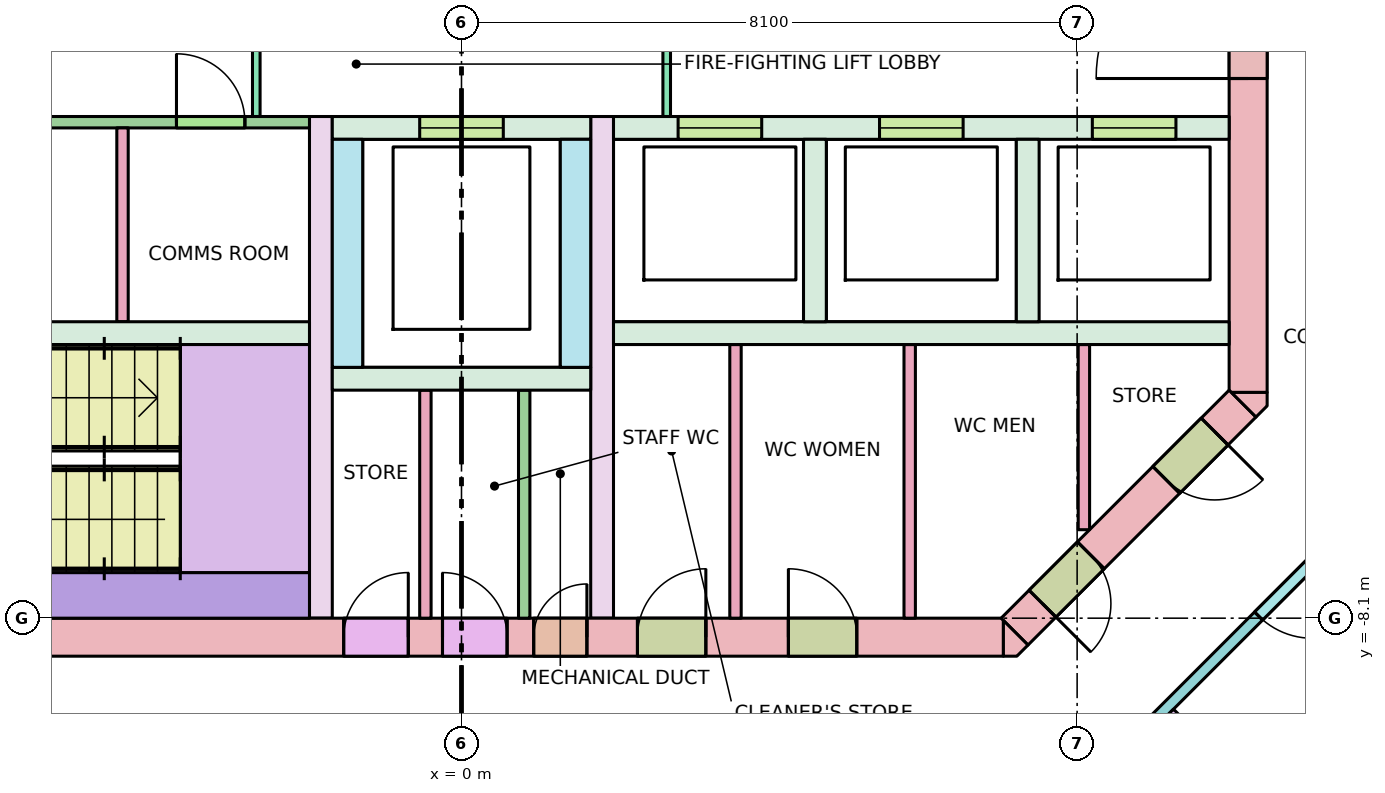
"""IFC4 building model, lengths in metres.
Left out: names, types, materials, properties, quantities, classifications, styles, units other than length and angle.
Written with IfcOpenShell. Run it as: python <this file> out.ifc"""

import sys

from ifc_helpers import new_model, si_unit, direction, frame, frame_2d, origin, place, context, subcontext, project, spatial, polyline, rectangle, outline, extrude, element, fill, save


model = new_model("IFC4")
c1 = context("Model", 3, precision=1e-05, world=origin(), true_north=direction((0.0, 1.0)))
c2 = subcontext(c1, "Body", "Model", "MODEL_VIEW")
j1 = project(units=[si_unit("LENGTHUNIT", "METRE"), si_unit("PLANEANGLEUNIT", "RADIAN")], contexts=[c1])
p1 = place(None, origin())
s1 = spatial("IfcSite", under=j1, at=p1, CompositionType="ELEMENT")
p2 = place(p1, origin())
s2 = spatial("IfcBuilding", under=s1, at=p2, CompositionType="ELEMENT")
p3 = place(p2, frame((0.0, 0.0, 272.3)))
s3 = spatial("IfcBuildingStorey", under=s2, at=p3, CompositionType="ELEMENT", Elevation=272.3)
p4 = place(p3, frame((-7.13, -8.35, -0.28), z_axis=(0.0, 0.0, 1.0), x_axis=(1.0, 0.0, 0.0)))
e1 = element("IfcWall", 1, at=p4, inside=s3, PredefinedType="SHEAR", context=c2, shape_type="SweptSolid", body=[
    extrude(rectangle(XDim=14.26, YDim=0.5, at=frame_2d((7.13, 0.0))), origin(), (0.0, 0.0, 1.0), 3.7),
])
p5 = place(p4, frame((8.08, 0.0, 0.28)))
e2 = element("IfcOpeningElement", 2, at=p5, cuts=e1, PredefinedType="OPENING", context=c2, shape_type="SweptSolid", body=[
    extrude(rectangle(XDim=0.7, YDim=2.1, at=frame_2d((0.35, 1.05))), frame((0.0, 0.26, 0.0), z_axis=(0.0, -1.0, 0.0), x_axis=(1.0, 0.0, 0.0)), (0.0, 0.0, 1.0), 0.52),
])
p6 = place(p4, frame((5.58, 0.0, 0.28)))
e3 = element("IfcOpeningElement", 3, at=p6, cuts=e1, PredefinedType="OPENING", context=c2, shape_type="SweptSolid", body=[
    extrude(rectangle(XDim=0.85, YDim=2.1, at=frame_2d((0.425, 1.05))), frame((0.0, 0.26, 0.0), z_axis=(0.0, -1.0, 0.0), x_axis=(1.0, 0.0, 0.0)), (0.0, 0.0, 1.0), 0.52),
])
p7 = place(p4, frame((6.88, 0.0, 0.28)))
e4 = element("IfcOpeningElement", 4, at=p7, cuts=e1, PredefinedType="OPENING", context=c2, shape_type="SweptSolid", body=[
    extrude(rectangle(XDim=0.85, YDim=2.1, at=frame_2d((0.425, 1.05))), frame((0.0, 0.26, 0.0), z_axis=(0.0, -1.0, 0.0), x_axis=(1.0, 0.0, 0.0)), (0.0, 0.0, 1.0), 0.52),
])
p8 = place(p4, frame((9.445, 0.0, 0.28)))
e5 = element("IfcOpeningElement", 5, at=p8, cuts=e1, PredefinedType="OPENING", context=c2, shape_type="SweptSolid", body=[
    extrude(rectangle(XDim=0.9, YDim=2.1, at=frame_2d((0.45, 1.05))), frame((0.0, 0.26, 0.0), z_axis=(0.0, -1.0, 0.0), x_axis=(1.0, 0.0, 0.0)), (0.0, 0.0, 1.0), 0.52),
])
p9 = place(p4, frame((11.431, 0.0, 0.28)))
e6 = element("IfcOpeningElement", 6, at=p9, cuts=e1, PredefinedType="OPENING", context=c2, shape_type="SweptSolid", body=[
    extrude(rectangle(XDim=0.9, YDim=2.1, at=frame_2d((0.45, 1.05))), frame((0.0, 0.26, 0.0), z_axis=(0.0, -1.0, 0.0), x_axis=(1.0, 0.0, 0.0)), (0.0, 0.0, 1.0), 0.52),
])
p10 = place(p3, frame((10.35, -5.13, -0.28), z_axis=(0.0, 0.0, 1.0), x_axis=(0.0, 1.0, 0.0)))
e7 = element("IfcWall", 7, at=p10, inside=s3, PredefinedType="SHEAR", context=c2, shape_type="SweptSolid", body=[
    extrude(rectangle(XDim=10.26, YDim=0.5, at=frame_2d((5.13, 0.0))), origin(), (0.0, 0.0, 1.0), 3.7),
])
p11 = place(p10, frame((4.13, 0.0, 0.28)))
e8 = element("IfcOpeningElement", 8, at=p11, cuts=e7, PredefinedType="OPENING", context=c2, shape_type="SweptSolid", body=[
    extrude(rectangle(XDim=2.0, YDim=2.1, at=frame_2d((1.0, 1.05))), frame((0.0, 0.26, 0.0), z_axis=(0.0, -1.0, 0.0), x_axis=(1.0, 0.0, 0.0)), (0.0, 0.0, 1.0), 0.52),
])
p12 = place(p3, frame((10.277, -5.277, -0.28), z_axis=(0.0, 0.0, 1.0), x_axis=(-0.707106781187, -0.707106781187, 0.0)))
e9 = element("IfcWall", 9, at=p12, inside=s3, PredefinedType="SHEAR", context=c2, shape_type="SweptSolid", body=[
    extrude(rectangle(XDim=4.243, YDim=0.5, at=frame_2d((2.121, 0.0))), origin(), (0.0, 0.0, 1.0), 3.7),
])
p13 = place(p12, frame((2.823, 0.0, 0.28)))
e10 = element("IfcOpeningElement", 10, at=p13, cuts=e9, PredefinedType="OPENING", context=c2, shape_type="SweptSolid", body=[
    extrude(rectangle(XDim=0.9, YDim=2.1, at=frame_2d((0.45, 1.05))), frame((0.0, 0.26, 0.0), z_axis=(0.0, -1.0, 0.0), x_axis=(1.0, 0.0, 0.0)), (0.0, 0.0, 1.0), 0.52),
])
p14 = place(p12, frame((0.52, 0.0, 0.28)))
e11 = element("IfcOpeningElement", 11, at=p14, cuts=e9, PredefinedType="OPENING", context=c2, shape_type="SweptSolid", body=[
    extrude(rectangle(XDim=0.9, YDim=2.1, at=frame_2d((0.45, 1.05))), frame((0.0, 0.26, 0.0), z_axis=(0.0, -1.0, 0.0), x_axis=(1.0, 0.0, 0.0)), (0.0, 0.0, 1.0), 0.52),
])
p15 = place(p3, frame((0.0, 0.0, -0.28)))
e12 = element("IfcWall", 12, at=p15, inside=s3, PredefinedType="SHEAR", context=c2, shape_type="SweptSolid", body=[
    extrude(outline(polyline([(7.307, -8.6), (7.13, -8.6), (7.13, -8.13), (7.454, -8.454), (7.307, -8.6)])), origin(), (0.0, 0.0, 1.0), 3.7),
])
p16 = place(p3, frame((0.0, 0.0, -0.28)))
e13 = element("IfcWall", 13, at=p16, inside=s3, PredefinedType="SHEAR", context=c2, shape_type="SweptSolid", body=[
    extrude(outline(polyline([(10.6, -5.307), (10.454, -5.454), (10.13, -5.13), (10.6, -5.13), (10.6, -5.307)])), origin(), (0.0, 0.0, 1.0), 3.7),
])
for number, where, z_axis, x_axis in (
    (14, (-10.1, -4.35, 0.0), (0.0, 0.0, 1.0), (1.0, 0.0, 0.0)),
    (15, (2.0, -4.35, 0.0), (0.0, 0.0, 1.0), (1.0, 0.0, 0.0)),
):
    element("IfcWall", number, at=place(p3, frame(where, z_axis=z_axis, x_axis=x_axis)), inside=s3, PredefinedType="SOLIDWALL", context=c2, shape_type="SweptSolid", body=[
        extrude(rectangle(XDim=8.1, YDim=0.3, at=frame_2d((4.05, 0.0))), origin(), (0.0, 0.0, 1.0), 3.42),
    ])
p17 = place(p3, frame((2.0, -1.65, 0.0), z_axis=(0.0, 0.0, 1.0), x_axis=(1.0, 0.0, 0.0)))
e16 = element("IfcWall", 16, at=p17, inside=s3, PredefinedType="SOLIDWALL", context=c2, shape_type="SweptSolid", body=[
    extrude(rectangle(XDim=8.1, YDim=0.3, at=frame_2d((4.05, 0.0))), origin(), (0.0, 0.0, 1.0), 3.42),
])
p18 = place(p17, frame((0.85, 0.0, 0.0)))
e17 = element("IfcOpeningElement", 17, at=p18, cuts=e16, PredefinedType="OPENING", context=c2, shape_type="SweptSolid", body=[
    extrude(rectangle(XDim=1.1, YDim=2.1, at=frame_2d((0.55, 1.05))), frame((0.0, 0.16, 0.0), z_axis=(0.0, -1.0, 0.0), x_axis=(1.0, 0.0, 0.0)), (0.0, 0.0, 1.0), 0.32),
])
p19 = place(p17, frame((3.5, 0.0, 0.0)))
e18 = element("IfcOpeningElement", 18, at=p19, cuts=e16, PredefinedType="OPENING", context=c2, shape_type="SweptSolid", body=[
    extrude(rectangle(XDim=1.1, YDim=2.1, at=frame_2d((0.55, 1.05))), frame((0.0, 0.16, 0.0), z_axis=(0.0, -1.0, 0.0), x_axis=(1.0, 0.0, 0.0)), (0.0, 0.0, 1.0), 0.32),
])
p20 = place(p17, frame((6.3, 0.0, 0.0)))
e19 = element("IfcOpeningElement", 19, at=p20, cuts=e16, PredefinedType="OPENING", context=c2, shape_type="SweptSolid", body=[
    extrude(rectangle(XDim=1.1, YDim=2.1, at=frame_2d((0.55, 1.05))), frame((0.0, 0.16, 0.0), z_axis=(0.0, -1.0, 0.0), x_axis=(1.0, 0.0, 0.0)), (0.0, 0.0, 1.0), 0.32),
])
for number, where, z_axis, x_axis in (
    (20, (4.65, -4.2, 0.0), (0.0, 0.0, 1.0), (0.0, 1.0, 0.0)),
    (21, (7.45, -4.2, 0.0), (0.0, 0.0, 1.0), (0.0, 1.0, 0.0)),
):
    element("IfcWall", number, at=place(p3, frame(where, z_axis=z_axis, x_axis=x_axis)), inside=s3, PredefinedType="SOLIDWALL", context=c2, shape_type="SweptSolid", body=[
        extrude(rectangle(XDim=2.4, YDim=0.3, at=frame_2d((1.2, 0.0))), origin(), (0.0, 0.0, 1.0), 3.42),
    ])
for number, where, z_axis, x_axis in (
    (22, (-1.85, -8.1, 0.0), (0.0, 0.0, 1.0), (0.0, 1.0, 0.0)),
    (23, (1.85, -8.1, 0.0), (0.0, 0.0, 1.0), (0.0, 1.0, 0.0)),
):
    element("IfcWall", number, at=place(p3, frame(where, z_axis=z_axis, x_axis=x_axis)), inside=s3, PredefinedType="SHEAR", context=c2, shape_type="SweptSolid", body=[
        extrude(rectangle(XDim=6.6, YDim=0.3, at=frame_2d((3.3, 0.0))), origin(), (0.0, 0.0, 1.0), 3.42),
    ])
p21 = place(p3, frame((-1.7, -1.65, 0.0), z_axis=(0.0, 0.0, 1.0), x_axis=(1.0, 0.0, 0.0)))
e24 = element("IfcWall", 24, at=p21, inside=s3, PredefinedType="SOLIDWALL", context=c2, shape_type="SweptSolid", body=[
    extrude(rectangle(XDim=3.4, YDim=0.3, at=frame_2d((1.7, 0.0))), origin(), (0.0, 0.0, 1.0), 3.42),
])
p22 = place(p21, frame((1.15, 0.0, 0.0)))
e25 = element("IfcOpeningElement", 25, at=p22, cuts=e24, PredefinedType="OPENING", context=c2, shape_type="SweptSolid", body=[
    extrude(rectangle(XDim=1.1, YDim=2.1, at=frame_2d((0.55, 1.05))), frame((0.0, 0.16, 0.0), z_axis=(0.0, -1.0, 0.0), x_axis=(1.0, 0.0, 0.0)), (0.0, 0.0, 1.0), 0.32),
])
for number, where, z_axis, x_axis in (
    (26, (-1.5, -4.8, 0.0), (0.0, 0.0, 1.0), (0.0, 1.0, 0.0)),
    (27, (1.5, -4.8, 0.0), (0.0, 0.0, 1.0), (0.0, 1.0, 0.0)),
):
    element("IfcWall", number, at=place(p3, frame(where, z_axis=z_axis, x_axis=x_axis)), inside=s3, PredefinedType="SOLIDWALL", context=c2, shape_type="SweptSolid", body=[
        extrude(rectangle(XDim=3.0, YDim=0.4, at=frame_2d((1.5, 0.0))), origin(), (0.0, 0.0, 1.0), 3.42),
    ])
p23 = place(p3, frame((-1.7, -4.95, 0.0), z_axis=(0.0, 0.0, 1.0), x_axis=(1.0, 0.0, 0.0)))
e28 = element("IfcWall", 28, at=p23, inside=s3, PredefinedType="SOLIDWALL", context=c2, shape_type="SweptSolid", body=[
    extrude(rectangle(XDim=3.4, YDim=0.3, at=frame_2d((1.7, 0.0))), origin(), (0.0, 0.0, 1.0), 3.42),
])
p24 = place(p3, frame((-7.37, -7.8, 0.0), z_axis=(0.0, 0.0, 1.0), x_axis=(1.0, 0.0, 0.0)))
e29 = element("IfcWall", 29, at=p24, inside=s3, PredefinedType="SHEAR", context=c2, shape_type="SweptSolid", body=[
    extrude(rectangle(XDim=5.37, YDim=0.6, at=frame_2d((2.685, 0.0))), origin(), (0.0, 0.0, 1.0), 3.42),
])
p25 = place(p3, frame((-2.7, -1.5, 0.0), z_axis=(0.0, 0.0, 1.0), x_axis=(0.0, 1.0, 0.0)))
e30 = element("IfcWall", 30, at=p25, inside=s3, PredefinedType="PARTITIONING", context=c2, shape_type="SweptSolid", body=[
    extrude(rectangle(XDim=3.0, YDim=0.1, at=frame_2d((1.5, 0.0))), origin(), (0.0, 0.0, 1.0), 3.42),
])
p26 = place(p25, frame((0.9, 0.0, 0.0)))
e31 = element("IfcOpeningElement", 31, at=p26, cuts=e30, PredefinedType="OPENING", context=c2, shape_type="SweptSolid", body=[
    extrude(rectangle(XDim=1.2, YDim=2.1, at=frame_2d((0.6, 1.05))), frame((0.0, 0.06, 0.0), z_axis=(0.0, -1.0, 0.0), x_axis=(1.0, 0.0, 0.0)), (0.0, 0.0, 1.0), 0.12),
])
p27 = place(p3, frame((2.7, -1.5, 0.0), z_axis=(0.0, 0.0, 1.0), x_axis=(0.0, 1.0, 0.0)))
e32 = element("IfcWall", 32, at=p27, inside=s3, PredefinedType="PARTITIONING", context=c2, shape_type="SweptSolid", body=[
    extrude(rectangle(XDim=3.0, YDim=0.1, at=frame_2d((1.5, 0.0))), origin(), (0.0, 0.0, 1.0), 3.42),
])
p28 = place(p27, frame((0.9, 0.0, 0.0)))
e33 = element("IfcOpeningElement", 33, at=p28, cuts=e32, PredefinedType="OPENING", context=c2, shape_type="SweptSolid", body=[
    extrude(rectangle(XDim=1.2, YDim=2.1, at=frame_2d((0.6, 1.05))), frame((0.0, 0.06, 0.0), z_axis=(0.0, -1.0, 0.0), x_axis=(1.0, 0.0, 0.0)), (0.0, 0.0, 1.0), 0.12),
])
for number, where, z_axis, x_axis in (
    (34, (0.825, -8.1, 0.0), (0.0, 0.0, 1.0), (0.0, 1.0, 0.0)),
    (35, (-0.475, -8.1, 0.0), (0.0, 0.0, 1.0), (0.0, 1.0, 0.0)),
):
    element("IfcWall", number, at=place(p3, frame(where, z_axis=z_axis, x_axis=x_axis)), inside=s3, PredefinedType="PARTITIONING", context=c2, shape_type="SweptSolid", body=[
        extrude(rectangle(XDim=3.0, YDim=0.15, at=frame_2d((1.5, 0.0))), origin(), (0.0, 0.0, 1.0), 3.42),
    ])
for number, where, z_axis, x_axis in (
    (36, (3.605, -8.1, 0.0), (0.0, 0.0, 1.0), (0.0, 1.0, 0.0)),
    (37, (5.897, -8.1, 0.0), (0.0, 0.0, 1.0), (0.0, 1.0, 0.0)),
):
    element("IfcWall", number, at=place(p3, frame(where, z_axis=z_axis, x_axis=x_axis)), inside=s3, PredefinedType="PARTITIONING", context=c2, shape_type="SweptSolid", body=[
        extrude(rectangle(XDim=3.6, YDim=0.15, at=frame_2d((1.8, 0.0))), origin(), (0.0, 0.0, 1.0), 3.42),
    ])
p29 = place(p3, frame((8.189, -6.936, 0.0), z_axis=(0.0, 0.0, 1.0), x_axis=(0.0, 1.0, 0.0)))
e38 = element("IfcWall", 38, at=p29, inside=s3, PredefinedType="PARTITIONING", context=c2, shape_type="SweptSolid", body=[
    extrude(rectangle(XDim=2.436, YDim=0.15, at=frame_2d((1.218, 0.0))), origin(), (0.0, 0.0, 1.0), 3.42),
])
p30 = place(p3, frame((-4.46, -4.2, 0.0), z_axis=(0.0, 0.0, 1.0), x_axis=(0.0, 1.0, 0.0)))
e39 = element("IfcWall", 39, at=p30, inside=s3, PredefinedType="PARTITIONING", context=c2, shape_type="SweptSolid", body=[
    extrude(rectangle(XDim=2.55, YDim=0.15, at=frame_2d((1.275, 0.0))), origin(), (0.0, 0.0, 1.0), 3.42),
])
p31 = place(p3, frame((-10.1, -1.575, 0.0), z_axis=(0.0, 0.0, 1.0), x_axis=(1.0, 0.0, 0.0)))
e40 = element("IfcWall", 40, at=p31, inside=s3, PredefinedType="PARTITIONING", context=c2, shape_type="SweptSolid", body=[
    extrude(rectangle(XDim=8.1, YDim=0.15, at=frame_2d((4.05, 0.0))), origin(), (0.0, 0.0, 1.0), 3.42),
])
p32 = place(p31, frame((2.333, 0.0, 0.0)))
e41 = element("IfcOpeningElement", 41, at=p32, cuts=e40, PredefinedType="OPENING", context=c2, shape_type="SweptSolid", body=[
    extrude(rectangle(XDim=0.9, YDim=2.1, at=frame_2d((0.45, 1.05))), frame((0.0, 0.085, 0.0), z_axis=(0.0, -1.0, 0.0), x_axis=(1.0, 0.0, 0.0)), (0.0, 0.0, 1.0), 0.17),
])
p33 = place(p31, frame((6.35, 0.0, 0.0)))
e42 = element("IfcOpeningElement", 42, at=p33, cuts=e40, PredefinedType="OPENING", context=c2, shape_type="SweptSolid", body=[
    extrude(rectangle(XDim=0.9, YDim=2.1, at=frame_2d((0.45, 1.05))), frame((0.0, 0.085, 0.0), z_axis=(0.0, -1.0, 0.0), x_axis=(1.0, 0.0, 0.0)), (0.0, 0.0, 1.0), 0.17),
])
p34 = place(p3, frame((12.438, -6.121, 0.0), z_axis=(0.0, 0.0, 1.0), x_axis=(-0.707106781187, -0.707106781187, 0.0)))
e43 = element("IfcWall", 43, at=p34, inside=s3, PredefinedType="PARTITIONING", context=c2, shape_type="SweptSolid", body=[
    extrude(rectangle(XDim=6.105, YDim=0.15, at=frame_2d((3.053, 0.0))), origin(), (0.0, 0.0, 1.0), 2.52),
])
p35 = place(p34, frame((1.758, 0.0, 0.0)))
e44 = element("IfcOpeningElement", 44, at=p35, cuts=e43, PredefinedType="OPENING", context=c2, shape_type="SweptSolid", body=[
    extrude(rectangle(XDim=1.0, YDim=2.1, at=frame_2d((0.5, 1.05))), frame((0.0, 0.085, 0.0), z_axis=(0.0, -1.0, 0.0), x_axis=(1.0, 0.0, 0.0)), (0.0, 0.0, 1.0), 0.17),
])
p36 = place(p3, frame((9.333, -9.333, 0.0), z_axis=(0.0, 0.0, 1.0), x_axis=(0.707106781187, -0.707106781187, 0.0)))
e45 = element("IfcWall", 45, at=p36, inside=s3, PredefinedType="PARTITIONING", context=c2, shape_type="SweptSolid", body=[
    extrude(rectangle(XDim=7.639, YDim=0.1, at=frame_2d((3.819, 0.0))), origin(), (0.0, 0.0, 1.0), 2.52),
])
p37 = place(p18, origin())
e46 = element("IfcDoor", 46, at=p37, inside=s3, OperationType="DOUBLE_DOOR_SLIDING", PredefinedType="DOOR", context=c2, shape_type="SweptSolid", body=[
    extrude(rectangle(XDim=1.1, YDim=2.1, at=frame_2d((0.55, 1.05))), frame((0.0, 0.025, 0.0), z_axis=(0.0, -1.0, 0.0), x_axis=(1.0, 0.0, 0.0)), (0.0, 0.0, 1.0), 0.05),
])
fill(e17, e46)
p38 = place(p19, origin())
e47 = element("IfcDoor", 47, at=p38, inside=s3, OperationType="DOUBLE_DOOR_SLIDING", PredefinedType="DOOR", context=c2, shape_type="SweptSolid", body=[
    extrude(rectangle(XDim=1.1, YDim=2.1, at=frame_2d((0.55, 1.05))), frame((0.0, 0.025, 0.0), z_axis=(0.0, -1.0, 0.0), x_axis=(1.0, 0.0, 0.0)), (0.0, 0.0, 1.0), 0.05),
])
fill(e18, e47)
p39 = place(p20, origin())
e48 = element("IfcDoor", 48, at=p39, inside=s3, OperationType="DOUBLE_DOOR_SLIDING", PredefinedType="DOOR", context=c2, shape_type="SweptSolid", body=[
    extrude(rectangle(XDim=1.1, YDim=2.1, at=frame_2d((0.55, 1.05))), frame((0.0, 0.025, 0.0), z_axis=(0.0, -1.0, 0.0), x_axis=(1.0, 0.0, 0.0)), (0.0, 0.0, 1.0), 0.05),
])
fill(e19, e48)
p40 = place(p22, origin())
e49 = element("IfcDoor", 49, at=p40, inside=s3, OperationType="DOUBLE_DOOR_SLIDING", PredefinedType="DOOR", context=c2, shape_type="SweptSolid", body=[
    extrude(rectangle(XDim=1.1, YDim=2.1, at=frame_2d((0.55, 1.05))), frame((0.0, 0.025, 0.0), z_axis=(0.0, -1.0, 0.0), x_axis=(1.0, 0.0, 0.0)), (0.0, 0.0, 1.0), 0.05),
])
fill(e25, e49)
p41 = place(p11, origin())
e50 = element("IfcDoor", 50, at=p41, inside=s3, OperationType="DOUBLE_DOOR_SINGLE_SWING", PredefinedType="DOOR", context=c2, shape_type="SweptSolid", body=[
    extrude(rectangle(XDim=2.0, YDim=2.1, at=frame_2d((1.0, 1.05))), frame((0.0, 0.025, 0.0), z_axis=(0.0, -1.0, 0.0), x_axis=(1.0, 0.0, 0.0)), (0.0, 0.0, 1.0), 0.05),
])
fill(e8, e50)
p42 = place(p5, origin())
e51 = element("IfcDoor", 51, at=p42, inside=s3, OperationType="SINGLE_SWING_RIGHT", PredefinedType="DOOR", context=c2, shape_type="SweptSolid", body=[
    extrude(rectangle(XDim=0.7, YDim=2.1, at=frame_2d((0.35, 1.05))), frame((0.0, 0.025, 0.0), z_axis=(0.0, -1.0, 0.0), x_axis=(1.0, 0.0, 0.0)), (0.0, 0.0, 1.0), 0.05),
])
fill(e2, e51)
p43 = place(p6, origin())
e52 = element("IfcDoor", 52, at=p43, inside=s3, OperationType="SINGLE_SWING_RIGHT", PredefinedType="DOOR", context=c2, shape_type="SweptSolid", body=[
    extrude(rectangle(XDim=0.85, YDim=2.1, at=frame_2d((0.425, 1.05))), frame((0.0, 0.025, 0.0), z_axis=(0.0, -1.0, 0.0), x_axis=(1.0, 0.0, 0.0)), (0.0, 0.0, 1.0), 0.05),
])
fill(e3, e52)
p44 = place(p7, origin())
e53 = element("IfcDoor", 53, at=p44, inside=s3, OperationType="SINGLE_SWING_LEFT", PredefinedType="DOOR", context=c2, shape_type="SweptSolid", body=[
    extrude(rectangle(XDim=0.85, YDim=2.1, at=frame_2d((0.425, 1.05))), frame((0.0, 0.025, 0.0), z_axis=(0.0, -1.0, 0.0), x_axis=(1.0, 0.0, 0.0)), (0.0, 0.0, 1.0), 0.05),
])
fill(e4, e53)
p45 = place(p8, origin())
e54 = element("IfcDoor", 54, at=p45, inside=s3, OperationType="SINGLE_SWING_RIGHT", PredefinedType="DOOR", context=c2, shape_type="SweptSolid", body=[
    extrude(rectangle(XDim=0.9, YDim=2.1, at=frame_2d((0.45, 1.05))), frame((0.0, 0.025, 0.0), z_axis=(0.0, -1.0, 0.0), x_axis=(1.0, 0.0, 0.0)), (0.0, 0.0, 1.0), 0.05),
])
fill(e5, e54)
p46 = place(p9, origin())
e55 = element("IfcDoor", 55, at=p46, inside=s3, OperationType="SINGLE_SWING_LEFT", PredefinedType="DOOR", context=c2, shape_type="SweptSolid", body=[
    extrude(rectangle(XDim=0.9, YDim=2.1, at=frame_2d((0.45, 1.05))), frame((0.0, 0.025, 0.0), z_axis=(0.0, -1.0, 0.0), x_axis=(1.0, 0.0, 0.0)), (0.0, 0.0, 1.0), 0.05),
])
fill(e6, e55)
p47 = place(p13, origin())
e56 = element("IfcDoor", 56, at=p47, inside=s3, OperationType="SINGLE_SWING_RIGHT", PredefinedType="DOOR", context=c2, shape_type="SweptSolid", body=[
    extrude(rectangle(XDim=0.9, YDim=2.1, at=frame_2d((0.45, 1.05))), frame((0.0, 0.025, 0.0), z_axis=(0.0, -1.0, 0.0), x_axis=(1.0, 0.0, 0.0)), (0.0, 0.0, 1.0), 0.05),
])
fill(e10, e56)
p48 = place(p14, origin())
e57 = element("IfcDoor", 57, at=p48, inside=s3, OperationType="SINGLE_SWING_LEFT", PredefinedType="DOOR", context=c2, shape_type="SweptSolid", body=[
    extrude(rectangle(XDim=0.9, YDim=2.1, at=frame_2d((0.45, 1.05))), frame((0.0, 0.025, 0.0), z_axis=(0.0, -1.0, 0.0), x_axis=(1.0, 0.0, 0.0)), (0.0, 0.0, 1.0), 0.05),
])
fill(e11, e57)
p49 = place(p33, origin())
e58 = element("IfcDoor", 58, at=p49, inside=s3, OperationType="SINGLE_SWING_LEFT", PredefinedType="DOOR", context=c2, shape_type="SweptSolid", body=[
    extrude(rectangle(XDim=0.9, YDim=2.1, at=frame_2d((0.45, 1.05))), frame((0.0, 0.025, 0.0), z_axis=(0.0, -1.0, 0.0), x_axis=(1.0, 0.0, 0.0)), (0.0, 0.0, 1.0), 0.05),
])
fill(e42, e58)
p50 = place(p35, origin())
e59 = element("IfcDoor", 59, at=p50, inside=s3, OperationType="SINGLE_SWING_LEFT", PredefinedType="DOOR", context=c2, shape_type="SweptSolid", body=[
    extrude(rectangle(XDim=1.0, YDim=2.1, at=frame_2d((0.5, 1.05))), frame((0.0, 0.025, 0.0), z_axis=(0.0, -1.0, 0.0), x_axis=(1.0, 0.0, 0.0)), (0.0, 0.0, 1.0), 0.05),
])
fill(e44, e59)
save(model, sys.argv[1])
